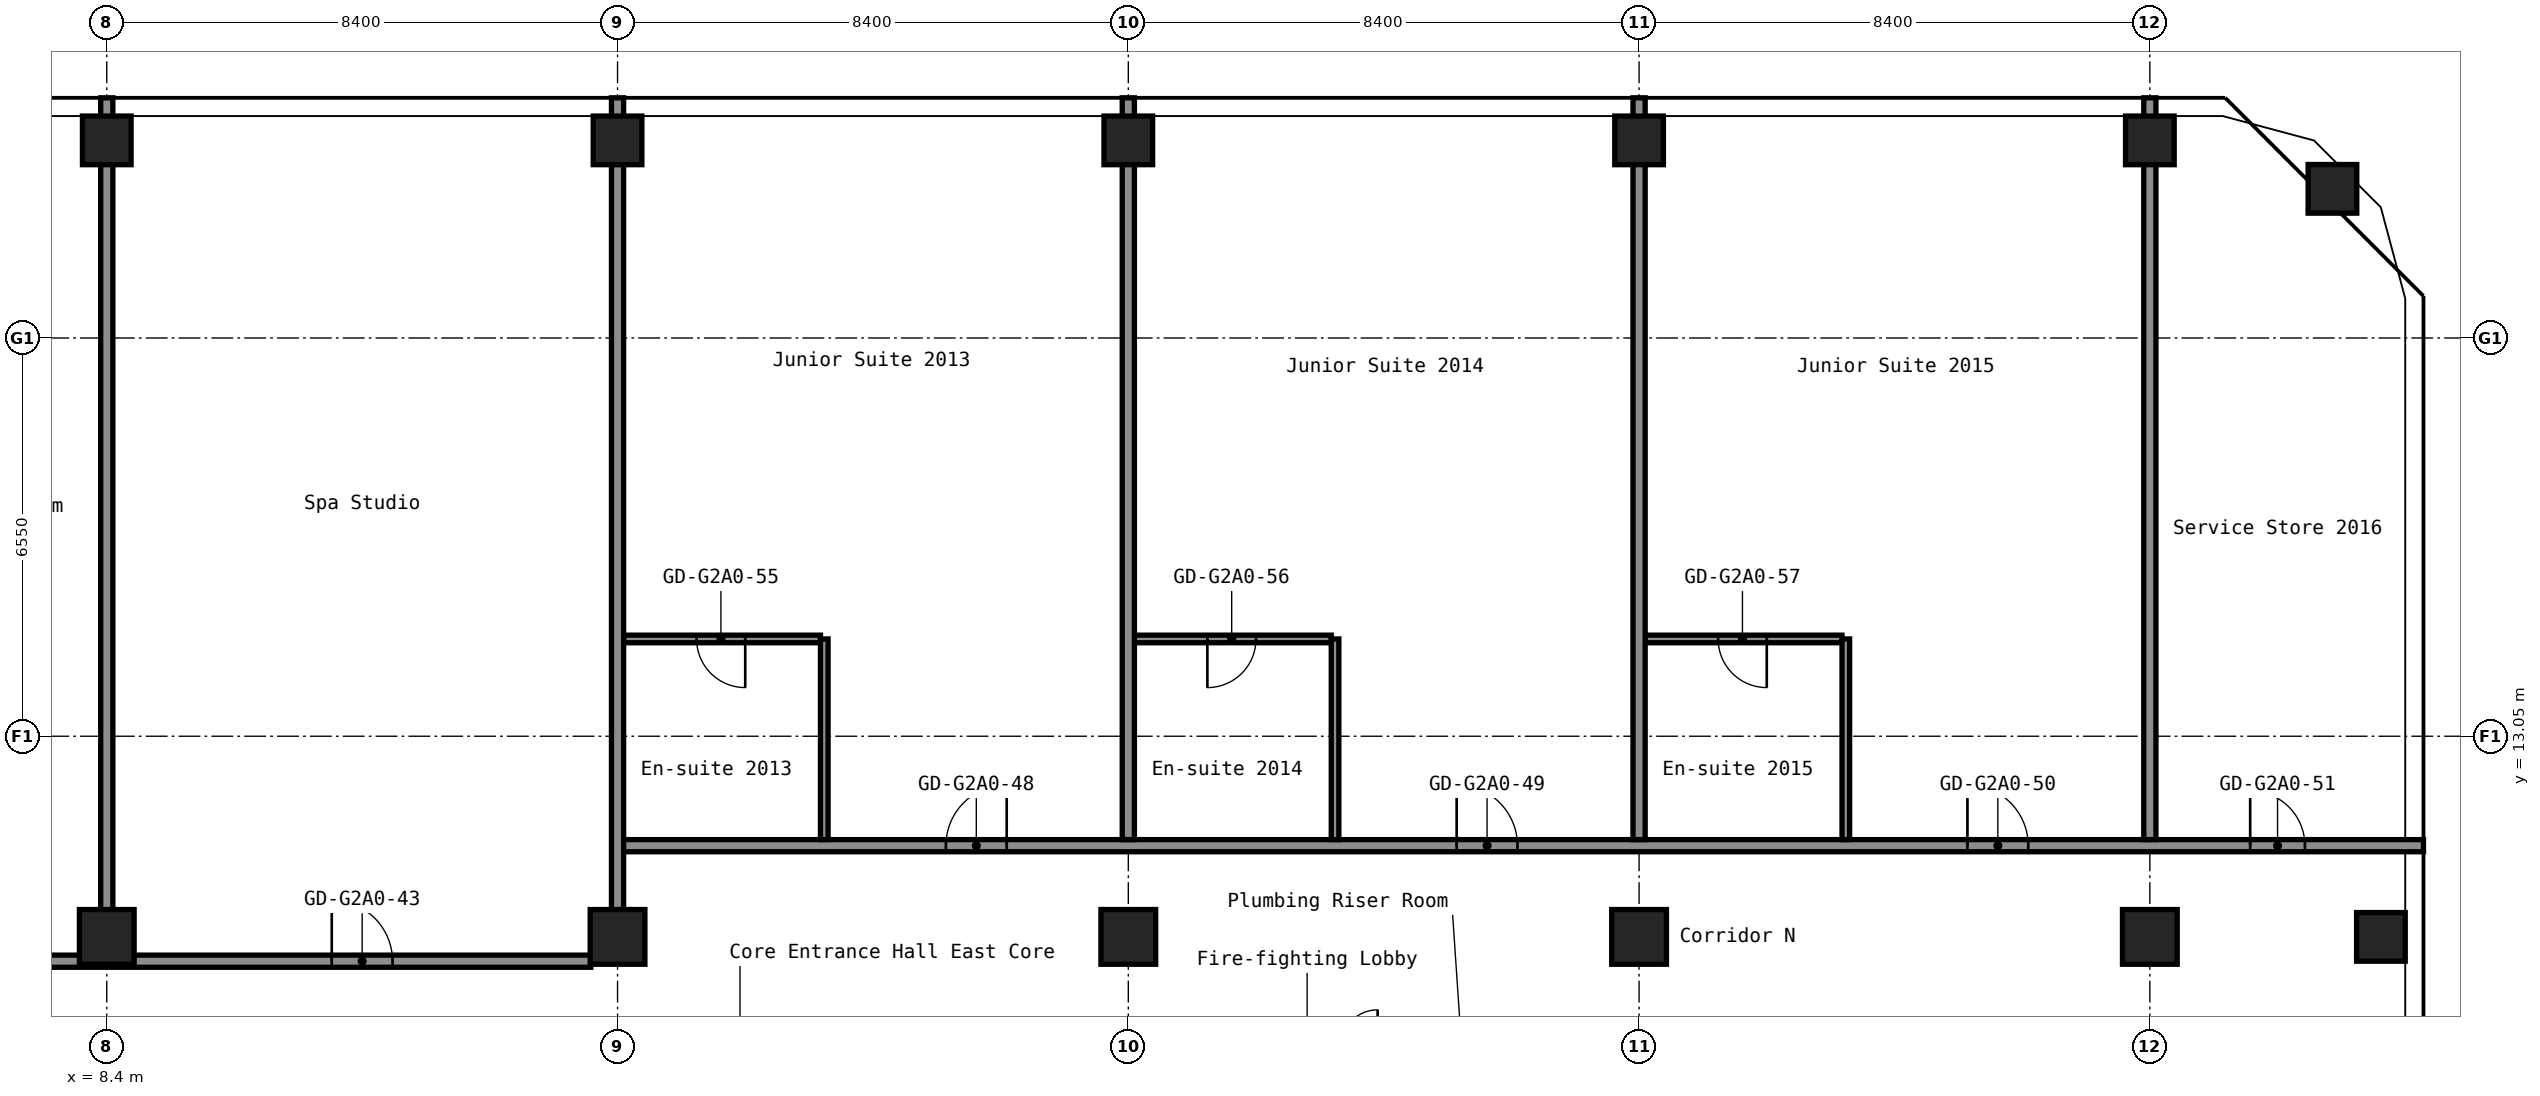
"""IFC4 building model, lengths in metres.
Left out: names, types, materials, properties, quantities, classifications, styles, units other than length and angle.
Written with IfcOpenShell. Run it as: python <this file> out.ifc"""

import sys

from ifc_helpers import new_model, si_unit, direction, frame, frame_2d, origin, origin_2d, place, context, subcontext, project, spatial, rectangle, hollow_rectangle, extrude, element, fill, save


model = new_model("IFC4")
c1 = context("Model", 3, precision=1e-05, world=origin(), true_north=direction((0.0, 1.0)))
c2 = subcontext(c1, "Body", "Model", "MODEL_VIEW")
j1 = project(units=[si_unit("LENGTHUNIT", "METRE"), si_unit("PLANEANGLEUNIT", "RADIAN")], contexts=[c1])
p1 = place(None, origin())
s1 = spatial("IfcSite", under=j1, at=p1, CompositionType="ELEMENT")
p2 = place(p1, origin())
s2 = spatial("IfcBuilding", under=s1, at=p2, CompositionType="ELEMENT")
p3 = place(p2, frame((0.0, 0.0, 75.4)))
s3 = spatial("IfcBuildingStorey", under=s2, at=p3, CompositionType="ELEMENT", Elevation=75.4)
p4 = place(p3, frame((8.4, 9.75, 0.0), z_axis=(0.0, 0.0, 1.0), x_axis=(1.0, 0.0, 0.0)))
e1 = element("IfcColumn", 1, at=p4, inside=s3, PredefinedType="COLUMN", context=c2, shape_type="SweptSolid", body=[
    extrude(hollow_rectangle(XDim=0.9, YDim=0.9, WallThickness=0.036, at=origin_2d()), origin(), (0.0, 0.0, 1.0), 2.8),
])
p5 = place(p3, frame((8.4, 22.85, 0.0), z_axis=(0.0, 0.0, 1.0), x_axis=(1.0, 0.0, 0.0)))
e2 = element("IfcColumn", 2, at=p5, inside=s3, PredefinedType="COLUMN", context=c2, shape_type="SweptSolid", body=[
    extrude(hollow_rectangle(XDim=0.8, YDim=0.8, WallThickness=0.032, at=origin_2d()), origin(), (0.0, 0.0, 1.0), 2.8),
])
p6 = place(p3, frame((16.8, 9.75, 0.0), z_axis=(0.0, 0.0, 1.0), x_axis=(1.0, 0.0, 0.0)))
e3 = element("IfcColumn", 3, at=p6, inside=s3, PredefinedType="COLUMN", context=c2, shape_type="SweptSolid", body=[
    extrude(hollow_rectangle(XDim=0.9, YDim=0.9, WallThickness=0.036, at=origin_2d()), origin(), (0.0, 0.0, 1.0), 2.8),
])
p7 = place(p3, frame((16.8, 22.85, 0.0), z_axis=(0.0, 0.0, 1.0), x_axis=(1.0, 0.0, 0.0)))
e4 = element("IfcColumn", 4, at=p7, inside=s3, PredefinedType="COLUMN", context=c2, shape_type="SweptSolid", body=[
    extrude(hollow_rectangle(XDim=0.8, YDim=0.8, WallThickness=0.032, at=origin_2d()), origin(), (0.0, 0.0, 1.0), 2.8),
])
p8 = place(p3, frame((25.2, 9.75, 0.0), z_axis=(0.0, 0.0, 1.0), x_axis=(1.0, 0.0, 0.0)))
e5 = element("IfcColumn", 5, at=p8, inside=s3, PredefinedType="COLUMN", context=c2, shape_type="SweptSolid", body=[
    extrude(hollow_rectangle(XDim=0.9, YDim=0.9, WallThickness=0.036, at=origin_2d()), origin(), (0.0, 0.0, 1.0), 2.8),
])
p9 = place(p3, frame((25.2, 22.85, 0.0), z_axis=(0.0, 0.0, 1.0), x_axis=(1.0, 0.0, 0.0)))
e6 = element("IfcColumn", 6, at=p9, inside=s3, PredefinedType="COLUMN", context=c2, shape_type="SweptSolid", body=[
    extrude(hollow_rectangle(XDim=0.8, YDim=0.8, WallThickness=0.032, at=origin_2d()), origin(), (0.0, 0.0, 1.0), 2.8),
])
p10 = place(p3, frame((33.6, 9.75, 0.0), z_axis=(0.0, 0.0, 1.0), x_axis=(1.0, 0.0, 0.0)))
e7 = element("IfcColumn", 7, at=p10, inside=s3, PredefinedType="COLUMN", context=c2, shape_type="SweptSolid", body=[
    extrude(hollow_rectangle(XDim=0.9, YDim=0.9, WallThickness=0.036, at=origin_2d()), origin(), (0.0, 0.0, 1.0), 2.8),
])
p11 = place(p3, frame((33.6, 22.85, 0.0), z_axis=(0.0, 0.0, 1.0), x_axis=(1.0, 0.0, 0.0)))
e8 = element("IfcColumn", 8, at=p11, inside=s3, PredefinedType="COLUMN", context=c2, shape_type="SweptSolid", body=[
    extrude(hollow_rectangle(XDim=0.8, YDim=0.8, WallThickness=0.032, at=origin_2d()), origin(), (0.0, 0.0, 1.0), 2.8),
])
p12 = place(p3, frame((42.0, 9.75, 0.0), z_axis=(0.0, 0.0, 1.0), x_axis=(1.0, 0.0, 0.0)))
e9 = element("IfcColumn", 9, at=p12, inside=s3, PredefinedType="COLUMN", context=c2, shape_type="SweptSolid", body=[
    extrude(hollow_rectangle(XDim=0.9, YDim=0.9, WallThickness=0.036, at=origin_2d()), origin(), (0.0, 0.0, 1.0), 2.8),
])
for number, where, z_axis, x_axis in (
    (10, (42.0, 22.85, 0.0), (0.0, 0.0, 1.0), (1.0, 0.0, 0.0)),
    (11, (45.8, 9.75, 0.0), (0.0, 0.0, 1.0), (1.0, 0.0, 0.0)),
    (12, (45.003, 22.053, 0.0), (0.0, 0.0, 1.0), (1.0, 0.0, 0.0)),
):
    element("IfcColumn", number, at=place(p3, frame(where, z_axis=z_axis, x_axis=x_axis)), inside=s3, PredefinedType="COLUMN", context=c2, shape_type="SweptSolid", body=[
        extrude(hollow_rectangle(XDim=0.8, YDim=0.8, WallThickness=0.032, at=origin_2d()), origin(), (0.0, 0.0, 1.0), 2.8),
    ])
p13 = place(p3, frame((-16.36, 9.35, 0.0), z_axis=(0.0, 0.0, 1.0), x_axis=(1.0, 0.0, 0.0)))
e13 = element("IfcWall", 13, at=p13, inside=s3, PredefinedType="PARTITIONING", context=c2, shape_type="SweptSolid", body=[
    extrude(rectangle(XDim=32.72, YDim=0.2, at=frame_2d((16.36, 0.0))), origin(), (0.0, 0.0, 1.0), 2.8),
])
p14 = place(p13, frame((1.545, 0.0, 0.0)))
e14 = element("IfcOpeningElement", 14, at=p14, cuts=e13, PredefinedType="OPENING", context=c2, shape_type="SweptSolid", body=[
    extrude(rectangle(XDim=0.9, YDim=2.1, at=frame_2d((0.45, 1.05))), frame((0.0, 0.11, 0.0), z_axis=(0.0, -1.0, 0.0), x_axis=(1.0, 0.0, 0.0)), (0.0, 0.0, 1.0), 0.22),
])
p15 = place(p13, frame((5.745, 0.0, 0.0)))
e15 = element("IfcOpeningElement", 15, at=p15, cuts=e13, PredefinedType="OPENING", context=c2, shape_type="SweptSolid", body=[
    extrude(rectangle(XDim=0.9, YDim=2.1, at=frame_2d((0.45, 1.05))), frame((0.0, 0.11, 0.0), z_axis=(0.0, -1.0, 0.0), x_axis=(1.0, 0.0, 0.0)), (0.0, 0.0, 1.0), 0.22),
])
p16 = place(p13, frame((9.275, 0.0, 0.0)))
e16 = element("IfcOpeningElement", 16, at=p16, cuts=e13, PredefinedType="OPENING", context=c2, shape_type="SweptSolid", body=[
    extrude(rectangle(XDim=0.9, YDim=2.1, at=frame_2d((0.45, 1.05))), frame((0.0, 0.11, 0.0), z_axis=(0.0, -1.0, 0.0), x_axis=(1.0, 0.0, 0.0)), (0.0, 0.0, 1.0), 0.22),
])
p17 = place(p13, frame((13.475, 0.0, 0.0)))
e17 = element("IfcOpeningElement", 17, at=p17, cuts=e13, PredefinedType="OPENING", context=c2, shape_type="SweptSolid", body=[
    extrude(rectangle(XDim=0.9, YDim=2.1, at=frame_2d((0.45, 1.05))), frame((0.0, 0.11, 0.0), z_axis=(0.0, -1.0, 0.0), x_axis=(1.0, 0.0, 0.0)), (0.0, 0.0, 1.0), 0.22),
])
p18 = place(p13, frame((17.76, 0.0, 0.0)))
e18 = element("IfcOpeningElement", 18, at=p18, cuts=e13, PredefinedType="OPENING", context=c2, shape_type="SweptSolid", body=[
    extrude(rectangle(XDim=0.9, YDim=2.1, at=frame_2d((0.45, 1.05))), frame((0.0, 0.11, 0.0), z_axis=(0.0, -1.0, 0.0), x_axis=(1.0, 0.0, 0.0)), (0.0, 0.0, 1.0), 0.22),
])
p19 = place(p13, frame((21.96, 0.0, 0.0)))
e19 = element("IfcOpeningElement", 19, at=p19, cuts=e13, PredefinedType="OPENING", context=c2, shape_type="SweptSolid", body=[
    extrude(rectangle(XDim=0.9, YDim=2.1, at=frame_2d((0.45, 1.05))), frame((0.0, 0.11, 0.0), z_axis=(0.0, -1.0, 0.0), x_axis=(1.0, 0.0, 0.0)), (0.0, 0.0, 1.0), 0.22),
])
p20 = place(p13, frame((28.46, 0.0, 0.0)))
e20 = element("IfcOpeningElement", 20, at=p20, cuts=e13, PredefinedType="OPENING", context=c2, shape_type="SweptSolid", body=[
    extrude(rectangle(XDim=1.0, YDim=2.1, at=frame_2d((0.5, 1.05))), frame((0.0, 0.11, 0.0), z_axis=(0.0, -1.0, 0.0), x_axis=(1.0, 0.0, 0.0)), (0.0, 0.0, 1.0), 0.22),
])
p21 = place(p3, frame((16.8, 11.25, 0.0), z_axis=(0.0, 0.0, 1.0), x_axis=(1.0, 0.0, 0.0)))
e21 = element("IfcWall", 21, at=p21, inside=s3, PredefinedType="PARTITIONING", context=c2, shape_type="SweptSolid", body=[
    extrude(rectangle(XDim=29.7, YDim=0.2, at=frame_2d((14.85, 0.0))), origin(), (0.0, 0.0, 1.0), 2.8),
])
p22 = place(p21, frame((5.4, 0.0, 0.0)))
e22 = element("IfcOpeningElement", 22, at=p22, cuts=e21, PredefinedType="OPENING", context=c2, shape_type="SweptSolid", body=[
    extrude(rectangle(XDim=1.0, YDim=2.1, at=frame_2d((0.5, 1.05))), frame((0.0, 0.11, 0.0), z_axis=(0.0, -1.0, 0.0), x_axis=(1.0, 0.0, 0.0)), (0.0, 0.0, 1.0), 0.22),
])
p23 = place(p21, frame((13.8, 0.0, 0.0)))
e23 = element("IfcOpeningElement", 23, at=p23, cuts=e21, PredefinedType="OPENING", context=c2, shape_type="SweptSolid", body=[
    extrude(rectangle(XDim=1.0, YDim=2.1, at=frame_2d((0.5, 1.05))), frame((0.0, 0.11, 0.0), z_axis=(0.0, -1.0, 0.0), x_axis=(1.0, 0.0, 0.0)), (0.0, 0.0, 1.0), 0.22),
])
p24 = place(p21, frame((22.2, 0.0, 0.0)))
e24 = element("IfcOpeningElement", 24, at=p24, cuts=e21, PredefinedType="OPENING", context=c2, shape_type="SweptSolid", body=[
    extrude(rectangle(XDim=1.0, YDim=2.1, at=frame_2d((0.5, 1.05))), frame((0.0, 0.11, 0.0), z_axis=(0.0, -1.0, 0.0), x_axis=(1.0, 0.0, 0.0)), (0.0, 0.0, 1.0), 0.22),
])
p25 = place(p21, frame((26.85, 0.0, 0.0)))
e25 = element("IfcOpeningElement", 25, at=p25, cuts=e21, PredefinedType="OPENING", context=c2, shape_type="SweptSolid", body=[
    extrude(rectangle(XDim=0.9, YDim=2.1, at=frame_2d((0.45, 1.05))), frame((0.0, 0.11, 0.0), z_axis=(0.0, -1.0, 0.0), x_axis=(1.0, 0.0, 0.0)), (0.0, 0.0, 1.0), 0.22),
])
p26 = place(p3, frame((16.9, 14.65, 0.0), z_axis=(0.0, 0.0, 1.0), x_axis=(1.0, 0.0, 0.0)))
e26 = element("IfcWall", 26, at=p26, inside=s3, PredefinedType="PARTITIONING", context=c2, shape_type="SweptSolid", body=[
    extrude(rectangle(XDim=3.238, YDim=0.125, at=frame_2d((1.619, 0.0))), origin(), (0.0, 0.0, 1.0), 2.8),
])
p27 = place(p26, frame((1.2, 0.0, 0.0)))
e27 = element("IfcOpeningElement", 27, at=p27, cuts=e26, PredefinedType="OPENING", context=c2, shape_type="SweptSolid", body=[
    extrude(rectangle(XDim=0.8, YDim=2.1, at=frame_2d((0.4, 1.05))), frame((0.0, 0.073, 0.0), z_axis=(0.0, -1.0, 0.0), x_axis=(1.0, 0.0, 0.0)), (0.0, 0.0, 1.0), 0.145),
])
p28 = place(p3, frame((25.3, 14.65, 0.0), z_axis=(0.0, 0.0, 1.0), x_axis=(1.0, 0.0, 0.0)))
e28 = element("IfcWall", 28, at=p28, inside=s3, PredefinedType="PARTITIONING", context=c2, shape_type="SweptSolid", body=[
    extrude(rectangle(XDim=3.238, YDim=0.125, at=frame_2d((1.619, 0.0))), origin(), (0.0, 0.0, 1.0), 2.8),
])
p29 = place(p28, frame((1.2, 0.0, 0.0)))
e29 = element("IfcOpeningElement", 29, at=p29, cuts=e28, PredefinedType="OPENING", context=c2, shape_type="SweptSolid", body=[
    extrude(rectangle(XDim=0.8, YDim=2.1, at=frame_2d((0.4, 1.05))), frame((0.0, 0.073, 0.0), z_axis=(0.0, -1.0, 0.0), x_axis=(1.0, 0.0, 0.0)), (0.0, 0.0, 1.0), 0.145),
])
p30 = place(p3, frame((33.7, 14.65, 0.0), z_axis=(0.0, 0.0, 1.0), x_axis=(1.0, 0.0, 0.0)))
e30 = element("IfcWall", 30, at=p30, inside=s3, PredefinedType="PARTITIONING", context=c2, shape_type="SweptSolid", body=[
    extrude(rectangle(XDim=3.238, YDim=0.125, at=frame_2d((1.619, 0.0))), origin(), (0.0, 0.0, 1.0), 2.8),
])
p31 = place(p30, frame((1.2, 0.0, 0.0)))
e31 = element("IfcOpeningElement", 31, at=p31, cuts=e30, PredefinedType="OPENING", context=c2, shape_type="SweptSolid", body=[
    extrude(rectangle(XDim=0.8, YDim=2.1, at=frame_2d((0.4, 1.05))), frame((0.0, 0.073, 0.0), z_axis=(0.0, -1.0, 0.0), x_axis=(1.0, 0.0, 0.0)), (0.0, 0.0, 1.0), 0.145),
])
for number, where, z_axis, x_axis in (
    (32, (8.4, 10.19, 0.0), (0.0, 0.0, 1.0), (0.0, 1.0, 0.0)),
    (33, (16.8, 10.19, 0.0), (0.0, 0.0, 1.0), (0.0, 1.0, 0.0)),
):
    element("IfcWall", number, at=place(p3, frame(where, z_axis=z_axis, x_axis=x_axis)), inside=s3, PredefinedType="PARTITIONING", context=c2, shape_type="SweptSolid", body=[
        extrude(rectangle(XDim=13.36, YDim=0.2, at=frame_2d((6.68, 0.0))), origin(), (0.0, 0.0, 1.0), 2.8),
    ])
p32 = place(p3, frame((20.2, 11.35, 0.0), z_axis=(0.0, 0.0, 1.0), x_axis=(0.0, 1.0, 0.0)))
e34 = element("IfcWall", 34, at=p32, inside=s3, PredefinedType="PARTITIONING", context=c2, shape_type="SweptSolid", body=[
    extrude(rectangle(XDim=3.3, YDim=0.125, at=frame_2d((1.65, 0.0))), origin(), (0.0, 0.0, 1.0), 2.8),
])
p33 = place(p3, frame((25.2, 11.35, 0.0), z_axis=(0.0, 0.0, 1.0), x_axis=(0.0, 1.0, 0.0)))
e35 = element("IfcWall", 35, at=p33, inside=s3, PredefinedType="PARTITIONING", context=c2, shape_type="SweptSolid", body=[
    extrude(rectangle(XDim=12.2, YDim=0.2, at=frame_2d((6.1, 0.0))), origin(), (0.0, 0.0, 1.0), 2.8),
])
p34 = place(p3, frame((28.6, 11.35, 0.0), z_axis=(0.0, 0.0, 1.0), x_axis=(0.0, 1.0, 0.0)))
e36 = element("IfcWall", 36, at=p34, inside=s3, PredefinedType="PARTITIONING", context=c2, shape_type="SweptSolid", body=[
    extrude(rectangle(XDim=3.3, YDim=0.125, at=frame_2d((1.65, 0.0))), origin(), (0.0, 0.0, 1.0), 2.8),
])
p35 = place(p3, frame((33.6, 11.35, 0.0), z_axis=(0.0, 0.0, 1.0), x_axis=(0.0, 1.0, 0.0)))
e37 = element("IfcWall", 37, at=p35, inside=s3, PredefinedType="PARTITIONING", context=c2, shape_type="SweptSolid", body=[
    extrude(rectangle(XDim=12.2, YDim=0.2, at=frame_2d((6.1, 0.0))), origin(), (0.0, 0.0, 1.0), 2.8),
])
p36 = place(p3, frame((37.0, 11.35, 0.0), z_axis=(0.0, 0.0, 1.0), x_axis=(0.0, 1.0, 0.0)))
e38 = element("IfcWall", 38, at=p36, inside=s3, PredefinedType="PARTITIONING", context=c2, shape_type="SweptSolid", body=[
    extrude(rectangle(XDim=3.3, YDim=0.125, at=frame_2d((1.65, 0.0))), origin(), (0.0, 0.0, 1.0), 2.8),
])
p37 = place(p3, frame((42.0, 11.35, 0.0), z_axis=(0.0, 0.0, 1.0), x_axis=(0.0, 1.0, 0.0)))
e39 = element("IfcWall", 39, at=p37, inside=s3, PredefinedType="PARTITIONING", context=c2, shape_type="SweptSolid", body=[
    extrude(rectangle(XDim=12.2, YDim=0.2, at=frame_2d((6.1, 0.0))), origin(), (0.0, 0.0, 1.0), 2.8),
])
p38 = place(p20, origin())
e40 = element("IfcDoor", 40, at=p38, inside=s3, OperationType="SINGLE_SWING_RIGHT", PredefinedType="DOOR", context=c2, shape_type="SweptSolid", body=[
    extrude(rectangle(XDim=1.0, YDim=2.1, at=frame_2d((0.5, 1.05))), frame((0.0, 0.025, 0.0), z_axis=(0.0, -1.0, 0.0), x_axis=(1.0, 0.0, 0.0)), (0.0, 0.0, 1.0), 0.05),
])
fill(e20, e40)
p39 = place(p22, origin())
e41 = element("IfcDoor", 41, at=p39, inside=s3, OperationType="SINGLE_SWING_LEFT", PredefinedType="DOOR", context=c2, shape_type="SweptSolid", body=[
    extrude(rectangle(XDim=1.0, YDim=2.1, at=frame_2d((0.5, 1.05))), frame((0.0, 0.025, 0.0), z_axis=(0.0, -1.0, 0.0), x_axis=(1.0, 0.0, 0.0)), (0.0, 0.0, 1.0), 0.05),
])
fill(e22, e41)
p40 = place(p23, origin())
e42 = element("IfcDoor", 42, at=p40, inside=s3, OperationType="SINGLE_SWING_RIGHT", PredefinedType="DOOR", context=c2, shape_type="SweptSolid", body=[
    extrude(rectangle(XDim=1.0, YDim=2.1, at=frame_2d((0.5, 1.05))), frame((0.0, 0.025, 0.0), z_axis=(0.0, -1.0, 0.0), x_axis=(1.0, 0.0, 0.0)), (0.0, 0.0, 1.0), 0.05),
])
fill(e23, e42)
p41 = place(p24, origin())
e43 = element("IfcDoor", 43, at=p41, inside=s3, OperationType="SINGLE_SWING_RIGHT", PredefinedType="DOOR", context=c2, shape_type="SweptSolid", body=[
    extrude(rectangle(XDim=1.0, YDim=2.1, at=frame_2d((0.5, 1.05))), frame((0.0, 0.025, 0.0), z_axis=(0.0, -1.0, 0.0), x_axis=(1.0, 0.0, 0.0)), (0.0, 0.0, 1.0), 0.05),
])
fill(e24, e43)
p42 = place(p25, origin())
e44 = element("IfcDoor", 44, at=p42, inside=s3, OperationType="SINGLE_SWING_RIGHT", PredefinedType="DOOR", context=c2, shape_type="SweptSolid", body=[
    extrude(rectangle(XDim=0.9, YDim=2.1, at=frame_2d((0.45, 1.05))), frame((0.0, 0.025, 0.0), z_axis=(0.0, -1.0, 0.0), x_axis=(1.0, 0.0, 0.0)), (0.0, 0.0, 1.0), 0.05),
])
fill(e25, e44)
p43 = place(p27, origin())
e45 = element("IfcDoor", 45, at=p43, inside=s3, OperationType="SINGLE_SWING_RIGHT", PredefinedType="DOOR", context=c2, shape_type="SweptSolid", body=[
    extrude(rectangle(XDim=0.8, YDim=2.1, at=frame_2d((0.4, 1.05))), frame((0.0, 0.025, 0.0), z_axis=(0.0, -1.0, 0.0), x_axis=(1.0, 0.0, 0.0)), (0.0, 0.0, 1.0), 0.05),
])
fill(e27, e45)
p44 = place(p29, origin())
e46 = element("IfcDoor", 46, at=p44, inside=s3, OperationType="SINGLE_SWING_LEFT", PredefinedType="DOOR", context=c2, shape_type="SweptSolid", body=[
    extrude(rectangle(XDim=0.8, YDim=2.1, at=frame_2d((0.4, 1.05))), frame((0.0, 0.025, 0.0), z_axis=(0.0, -1.0, 0.0), x_axis=(1.0, 0.0, 0.0)), (0.0, 0.0, 1.0), 0.05),
])
fill(e29, e46)
p45 = place(p31, origin())
e47 = element("IfcDoor", 47, at=p45, inside=s3, OperationType="SINGLE_SWING_RIGHT", PredefinedType="DOOR", context=c2, shape_type="SweptSolid", body=[
    extrude(rectangle(XDim=0.8, YDim=2.1, at=frame_2d((0.4, 1.05))), frame((0.0, 0.025, 0.0), z_axis=(0.0, -1.0, 0.0), x_axis=(1.0, 0.0, 0.0)), (0.0, 0.0, 1.0), 0.05),
])
fill(e31, e47)
save(model, sys.argv[1])
